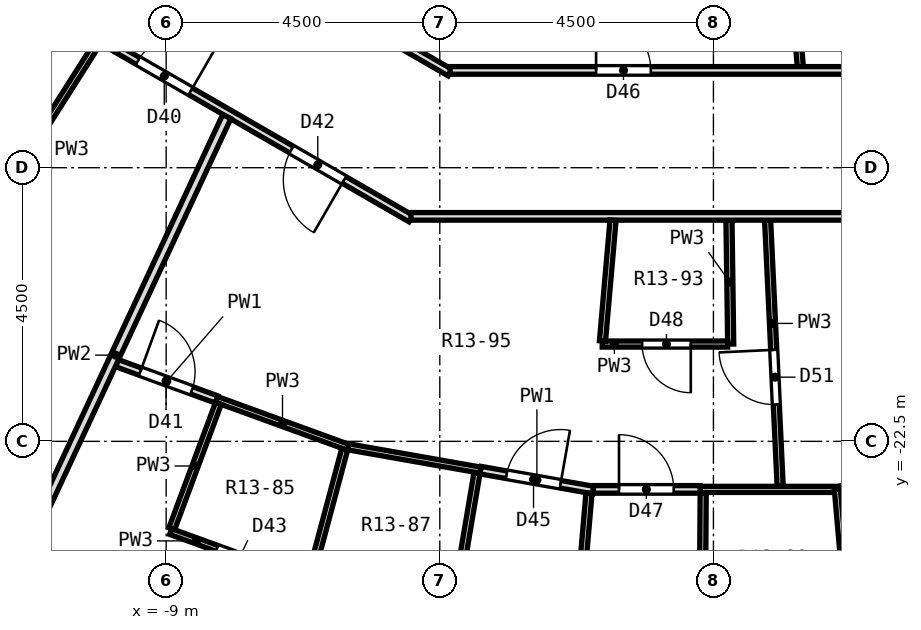
"""IFC4 building model, lengths in metres.
Left out: names, types, materials, properties, quantities, classifications, styles, units other than length and angle.
Written with IfcOpenShell. Run it as: python <this file> out.ifc"""

import sys

from ifc_helpers import new_model, si_unit, direction, frame, frame_2d, origin, place, context, subcontext, project, spatial, rectangle, extrude, element, fill, save


model = new_model("IFC4")
c1 = context("Model", 3, precision=1e-05, world=origin(), true_north=direction((0.0, 1.0)))
c2 = subcontext(c1, "Body", "Model", "MODEL_VIEW")
j1 = project(units=[si_unit("LENGTHUNIT", "METRE"), si_unit("PLANEANGLEUNIT", "RADIAN")], contexts=[c1])
p1 = place(None, origin())
s1 = spatial("IfcSite", under=j1, at=p1, CompositionType="ELEMENT")
p2 = place(p1, origin())
s2 = spatial("IfcBuilding", under=s1, at=p2, CompositionType="ELEMENT")
p3 = place(p2, frame((0.0, 0.0, 65.9)))
s3 = spatial("IfcBuildingStorey", under=s2, at=p3, CompositionType="ELEMENT", Elevation=65.9)
p4 = place(p3, frame((0.256, -18.863, 0.0), z_axis=(0.0, 0.0, 1.0), x_axis=(0.013779398664, -0.999905059579, 0.0)))
e1 = element("IfcWall", 1, at=p4, inside=s3, PredefinedType="PARTITIONING", context=c2, shape_type="SweptSolid", body=[
    extrude(rectangle(XDim=2.038, YDim=0.1, at=frame_2d((1.019, 0.0))), origin(), (0.0, 0.0, 1.0), 2.75),
])
p5 = place(p3, frame((0.891, -18.863, 0.0), z_axis=(0.0, 0.0, 1.0), x_axis=(0.047186643512, -0.998886089939, 0.0)))
e2 = element("IfcWall", 2, at=p5, inside=s3, PredefinedType="PARTITIONING", context=c2, shape_type="SweptSolid", body=[
    extrude(rectangle(XDim=4.382, YDim=0.1, at=frame_2d((2.191, 0.0))), origin(), (0.0, 0.0, 1.0), 2.75),
])
p6 = place(p5, frame((2.135, 0.0, 0.0)))
e3 = element("IfcOpeningElement", 3, at=p6, cuts=e2, PredefinedType="OPENING", context=c2, shape_type="SweptSolid", body=[
    extrude(rectangle(XDim=0.9, YDim=2.1, at=frame_2d((0.45, 1.05))), frame((0.0, 0.062, 0.0), z_axis=(0.0, -1.0, 0.0), x_axis=(1.0, 0.0, 0.0)), (0.0, 0.0, 1.0), 0.124),
])
p7 = place(p3, frame((1.102, -12.6, 0.0), z_axis=(0.0, 0.0, 1.0), x_axis=(0.087191165371, -0.996191598379, 0.0)))
e4 = element("IfcWall", 4, at=p7, inside=s3, PredefinedType="PARTITIONING", context=c2, shape_type="SweptSolid", body=[
    extrude(rectangle(XDim=3.752, YDim=0.1, at=frame_2d((1.876, 0.0))), origin(), (0.0, 0.0, 1.0), 2.75),
])
p8 = place(p3, frame((2.038, -23.29, 0.0), z_axis=(0.0, 0.0, 1.0), x_axis=(0.087200034709, -0.996190822055, 0.0)))
e5 = element("IfcWall", 5, at=p8, inside=s3, PredefinedType="PARTITIONING", context=c2, shape_type="SweptSolid", body=[
    extrude(rectangle(XDim=4.211, YDim=0.1, at=frame_2d((2.105, 0.0))), origin(), (0.0, 0.0, 1.0), 2.75),
])
p9 = place(p3, frame((-13.709, -13.794, 0.0), z_axis=(0.0, 0.0, 1.0), x_axis=(0.866059817553, -0.499940388867, 0.0)))
e6 = element("IfcWall", 6, at=p9, inside=s3, PredefinedType="PARTITIONING", context=c2, shape_type="SweptSolid", body=[
    extrude(rectangle(XDim=10.085, YDim=0.125, at=frame_2d((5.042, 0.0))), origin(), (0.0, 0.0, 1.0), 2.75),
])
p10 = place(p9, frame((1.61, 0.0, 0.0)))
e7 = element("IfcOpeningElement", 7, at=p10, cuts=e6, PredefinedType="OPENING", context=c2, shape_type="SweptSolid", body=[
    extrude(rectangle(XDim=0.9, YDim=2.1, at=frame_2d((0.45, 1.05))), frame((0.0, 0.074, 0.0), z_axis=(0.0, -1.0, 0.0), x_axis=(1.0, 0.0, 0.0)), (0.0, 0.0, 1.0), 0.149),
])
p11 = place(p9, frame((4.901, 0.0, 0.0)))
e8 = element("IfcOpeningElement", 8, at=p11, cuts=e6, PredefinedType="OPENING", context=c2, shape_type="SweptSolid", body=[
    extrude(rectangle(XDim=1.0, YDim=2.1, at=frame_2d((0.5, 1.05))), frame((0.0, 0.074, 0.0), z_axis=(0.0, -1.0, 0.0), x_axis=(1.0, 0.0, 0.0)), (0.0, 0.0, 1.0), 0.149),
])
p12 = place(p9, frame((7.816, 0.0, 0.0)))
e9 = element("IfcOpeningElement", 9, at=p12, cuts=e6, PredefinedType="OPENING", context=c2, shape_type="SweptSolid", body=[
    extrude(rectangle(XDim=1.0, YDim=2.1, at=frame_2d((0.5, 1.05))), frame((0.0, 0.074, 0.0), z_axis=(0.0, -1.0, 0.0), x_axis=(1.0, 0.0, 0.0)), (0.0, 0.0, 1.0), 0.149),
])
p13 = place(p3, frame((-12.006, -12.006, 0.0), z_axis=(0.0, 0.0, 1.0), x_axis=(0.866073188118, -0.499917225971, 0.0)))
e10 = element("IfcWall", 10, at=p13, inside=s3, PredefinedType="PARTITIONING", context=c2, shape_type="SweptSolid", body=[
    extrude(rectangle(XDim=8.861, YDim=0.125, at=frame_2d((4.431, 0.0))), origin(), (0.0, 0.0, 1.0), 2.75),
])
p14 = place(p13, frame((3.193, 0.0, 0.0)))
e11 = element("IfcOpeningElement", 11, at=p14, cuts=e10, PredefinedType="OPENING", context=c2, shape_type="SweptSolid", body=[
    extrude(rectangle(XDim=0.9, YDim=2.1, at=frame_2d((0.45, 1.05))), frame((0.0, 0.074, 0.0), z_axis=(0.0, -1.0, 0.0), x_axis=(1.0, 0.0, 0.0)), (0.0, 0.0, 1.0), 0.149),
])
p15 = place(p3, frame((-8.925, -23.983, 0.0), z_axis=(0.0, 0.0, 1.0), x_axis=(0.939643152994, -0.342156024399, 0.0)))
e12 = element("IfcWall", 12, at=p15, inside=s3, PredefinedType="PARTITIONING", context=c2, shape_type="SweptSolid", body=[
    extrude(rectangle(XDim=2.373, YDim=0.1, at=frame_2d((1.187, 0.0))), origin(), (0.0, 0.0, 1.0), 2.75),
])
p16 = place(p15, frame((0.812, 0.0, 0.0)))
e13 = element("IfcOpeningElement", 13, at=p16, cuts=e12, PredefinedType="OPENING", context=c2, shape_type="SweptSolid", body=[
    extrude(rectangle(XDim=0.8, YDim=2.1, at=frame_2d((0.4, 1.05))), frame((0.0, 0.062, 0.0), z_axis=(0.0, -1.0, 0.0), x_axis=(1.0, 0.0, 0.0)), (0.0, 0.0, 1.0), 0.124),
])
p17 = place(p3, frame((-8.17, -21.811, 0.0), z_axis=(0.0, 0.0, 1.0), x_axis=(0.939700645731, -0.341998094165, 0.0)))
e14 = element("IfcWall", 14, at=p17, inside=s3, PredefinedType="PARTITIONING", context=c2, shape_type="SweptSolid", body=[
    extrude(rectangle(XDim=2.306, YDim=0.1, at=frame_2d((1.153, 0.0))), origin(), (0.0, 0.0, 1.0), 2.75),
])
p18 = place(p3, frame((-9.809, -21.214, 0.0), z_axis=(0.0, 0.0, 1.0), x_axis=(0.939605351125, -0.342259819635, 0.0)))
e15 = element("IfcWall", 15, at=p18, inside=s3, PredefinedType="PARTITIONING", context=c2, shape_type="SweptSolid", body=[
    extrude(rectangle(XDim=1.745, YDim=0.125, at=frame_2d((0.873, 0.0))), origin(), (0.0, 0.0, 1.0), 2.75),
])
p19 = place(p18, frame((0.41, 0.0, 0.0)))
e16 = element("IfcOpeningElement", 16, at=p19, cuts=e15, PredefinedType="OPENING", context=c2, shape_type="SweptSolid", body=[
    extrude(rectangle(XDim=0.9, YDim=2.1, at=frame_2d((0.45, 1.05))), frame((0.0, 0.074, 0.0), z_axis=(0.0, -1.0, 0.0), x_axis=(1.0, 0.0, 0.0)), (0.0, 0.0, 1.0), 0.149),
])
p20 = place(p3, frame((-6.002, -22.591, 0.0), z_axis=(0.0, 0.0, 1.0), x_axis=(0.984800270927, -0.173690605338, 0.0)))
e17 = element("IfcWall", 17, at=p20, inside=s3, PredefinedType="PARTITIONING", context=c2, shape_type="SweptSolid", body=[
    extrude(rectangle(XDim=2.205, YDim=0.1, at=frame_2d((1.103, 0.0))), origin(), (0.0, 0.0, 1.0), 2.75),
])
p21 = place(p3, frame((-3.83, -22.974, 0.0), z_axis=(0.0, 0.0, 1.0), x_axis=(0.984767891191, -0.173874093757, 0.0)))
e18 = element("IfcWall", 18, at=p21, inside=s3, PredefinedType="PARTITIONING", context=c2, shape_type="SweptSolid", body=[
    extrude(rectangle(XDim=1.883, YDim=0.125, at=frame_2d((0.941, 0.0))), origin(), (0.0, 0.0, 1.0), 2.75),
])
p22 = place(p21, frame((0.435, 0.0, 0.0)))
e19 = element("IfcOpeningElement", 19, at=p22, cuts=e18, PredefinedType="OPENING", context=c2, shape_type="SweptSolid", body=[
    extrude(rectangle(XDim=0.9, YDim=2.1, at=frame_2d((0.45, 1.05))), frame((0.0, 0.074, 0.0), z_axis=(0.0, -1.0, 0.0), x_axis=(1.0, 0.0, 0.0)), (0.0, 0.0, 1.0), 0.149),
])
p23 = place(p3, frame((-0.218, -23.29, 0.0), z_axis=(0.0, 0.0, 1.0), x_axis=(1.0, 0.0, 0.0)))
e20 = element("IfcWall", 20, at=p23, inside=s3, PredefinedType="PARTITIONING", context=c2, shape_type="SweptSolid", body=[
    extrude(rectangle(XDim=2.206, YDim=0.1, at=frame_2d((1.103, 0.0))), origin(), (0.0, 0.0, 1.0), 2.75),
])
p24 = place(p3, frame((-1.976, -23.29, 0.0), z_axis=(0.0, 0.0, 1.0), x_axis=(1.0, 0.0, 0.0)))
e21 = element("IfcWall", 21, at=p24, inside=s3, PredefinedType="PARTITIONING", context=c2, shape_type="SweptSolid", body=[
    extrude(rectangle(XDim=1.758, YDim=0.125, at=frame_2d((0.879, 0.0))), origin(), (0.0, 0.0, 1.0), 2.75),
])
p25 = place(p24, frame((0.423, 0.0, 0.0)))
e22 = element("IfcOpeningElement", 22, at=p25, cuts=e21, PredefinedType="OPENING", context=c2, shape_type="SweptSolid", body=[
    extrude(rectangle(XDim=0.9, YDim=2.1, at=frame_2d((0.45, 1.05))), frame((0.0, 0.074, 0.0), z_axis=(0.0, -1.0, 0.0), x_axis=(1.0, 0.0, 0.0)), (0.0, 0.0, 1.0), 0.149),
])
p26 = place(p3, frame((-1.829, -20.9, 0.0), z_axis=(0.0, 0.0, 1.0), x_axis=(1.0, 0.0, 0.0)))
e23 = element("IfcWall", 23, at=p26, inside=s3, PredefinedType="PARTITIONING", context=c2, shape_type="SweptSolid", body=[
    extrude(rectangle(XDim=2.063, YDim=0.1, at=frame_2d((1.031, 0.0))), origin(), (0.0, 0.0, 1.0), 2.75),
])
p27 = place(p26, frame((0.656, 0.0, 0.0)))
e24 = element("IfcOpeningElement", 24, at=p27, cuts=e23, PredefinedType="OPENING", context=c2, shape_type="SweptSolid", body=[
    extrude(rectangle(XDim=0.8, YDim=2.1, at=frame_2d((0.4, 1.05))), frame((0.0, 0.062, 0.0), z_axis=(0.0, -1.0, 0.0), x_axis=(1.0, 0.0, 0.0)), (0.0, 0.0, 1.0), 0.124),
])
p28 = place(p3, frame((-4.975, -18.8, 0.0), z_axis=(0.0, 0.0, 1.0), x_axis=(1.0, 0.0, 0.0)))
e25 = element("IfcWall", 25, at=p28, inside=s3, PredefinedType="PARTITIONING", context=c2, shape_type="SweptSolid", body=[
    extrude(rectangle(XDim=9.937, YDim=0.125, at=frame_2d((4.968, 0.0))), origin(), (0.0, 0.0, 1.0), 2.75),
])
p29 = place(p3, frame((-4.332, -16.4, 0.0), z_axis=(0.0, 0.0, 1.0), x_axis=(1.0, 0.0, 0.0)))
e26 = element("IfcWall", 26, at=p29, inside=s3, PredefinedType="PARTITIONING", context=c2, shape_type="SweptSolid", body=[
    extrude(rectangle(XDim=8.798, YDim=0.125, at=frame_2d((4.399, 0.0))), origin(), (0.0, 0.0, 1.0), 2.75),
])
p30 = place(p29, frame((2.402, 0.0, 0.0)))
e27 = element("IfcOpeningElement", 27, at=p30, cuts=e26, PredefinedType="OPENING", context=c2, shape_type="SweptSolid", body=[
    extrude(rectangle(XDim=0.9, YDim=2.1, at=frame_2d((0.45, 1.05))), frame((0.0, 0.074, 0.0), z_axis=(0.0, -1.0, 0.0), x_axis=(1.0, 0.0, 0.0)), (0.0, 0.0, 1.0), 0.149),
])
p31 = place(p3, frame((2.087, -23.281, 0.0), z_axis=(0.0, 0.0, 1.0), x_axis=(0.984804573467, 0.173666208797, 0.0)))
e28 = element("IfcWall", 28, at=p31, inside=s3, PredefinedType="PARTITIONING", context=c2, shape_type="SweptSolid", body=[
    extrude(rectangle(XDim=2.104, YDim=0.1, at=frame_2d((1.052, 0.0))), origin(), (0.0, 0.0, 1.0), 2.75),
])
p32 = place(p3, frame((-12.361, -19.467, 0.0), z_axis=(0.0, 0.0, 1.0), x_axis=(0.535975761714, 0.844233369901, 0.0)))
e29 = element("IfcWall", 29, at=p32, inside=s3, PredefinedType="PARTITIONING", context=c2, shape_type="SweptSolid", body=[
    extrude(rectangle(XDim=4.18, YDim=0.1, at=frame_2d((2.09, 0.0))), origin(), (0.0, 0.0, 1.0), 2.75),
])
p33 = place(p3, frame((-11.659, -25.006, 0.0), z_axis=(0.0, 0.0, 1.0), x_axis=(0.422344925588, 0.906435195604, 0.0)))
e30 = element("IfcWall", 30, at=p33, inside=s3, PredefinedType="PARTITIONING", context=c2, shape_type="SweptSolid", body=[
    extrude(rectangle(XDim=8.655, YDim=0.15, at=frame_2d((4.328, 0.0))), origin(), (0.0, 0.0, 1.0), 2.75),
])
p34 = place(p3, frame((-8.907, -23.936, 0.0), z_axis=(0.0, 0.0, 1.0), x_axis=(0.348774527409, 0.937206662925, 0.0)))
e31 = element("IfcWall", 31, at=p34, inside=s3, PredefinedType="PARTITIONING", context=c2, shape_type="SweptSolid", body=[
    extrude(rectangle(XDim=2.199, YDim=0.1, at=frame_2d((1.1, 0.0))), origin(), (0.0, 0.0, 1.0), 2.75),
])
p35 = place(p3, frame((-7.14, -26.65, 0.0), z_axis=(0.0, 0.0, 1.0), x_axis=(0.258611937806, 0.965981296726, 0.0)))
e32 = element("IfcWall", 32, at=p35, inside=s3, PredefinedType="PARTITIONING", context=c2, shape_type="SweptSolid", body=[
    extrude(rectangle(XDim=4.161, YDim=0.1, at=frame_2d((2.081, 0.0))), origin(), (0.0, 0.0, 1.0), 2.75),
])
p36 = place(p3, frame((-4.254, -25.184, 0.0), z_axis=(0.0, 0.0, 1.0), x_axis=(0.166534432253, 0.986035639759, 0.0)))
e33 = element("IfcWall", 33, at=p36, inside=s3, PredefinedType="PARTITIONING", context=c2, shape_type="SweptSolid", body=[
    extrude(rectangle(XDim=2.187, YDim=0.1, at=frame_2d((1.094, 0.0))), origin(), (0.0, 0.0, 1.0), 2.75),
])
p37 = place(p3, frame((-2.405, -27.485, 0.0), z_axis=(0.0, 0.0, 1.0), x_axis=(0.086512794622, 0.996250739707, 0.0)))
e34 = element("IfcWall", 34, at=p37, inside=s3, PredefinedType="PARTITIONING", context=c2, shape_type="SweptSolid", body=[
    extrude(rectangle(XDim=4.148, YDim=0.1, at=frame_2d((2.074, 0.0))), origin(), (0.0, 0.0, 1.0), 2.75),
])
p38 = place(p3, frame((-1.825, -20.85, 0.0), z_axis=(0.0, 0.0, 1.0), x_axis=(0.087115345234, 0.996198231591, 0.0)))
e35 = element("IfcWall", 35, at=p38, inside=s3, PredefinedType="PARTITIONING", context=c2, shape_type="SweptSolid", body=[
    extrude(rectangle(XDim=1.995, YDim=0.1, at=frame_2d((0.998, 0.0))), origin(), (0.0, 0.0, 1.0), 2.75),
])
p39 = place(p3, frame((-0.184, -25.54, 0.0), z_axis=(0.0, 0.0, 1.0), x_axis=(0.006919477202, 0.999976060131, 0.0)))
e36 = element("IfcWall", 36, at=p39, inside=s3, PredefinedType="PARTITIONING", context=c2, shape_type="SweptSolid", body=[
    extrude(rectangle(XDim=2.188, YDim=0.1, at=frame_2d((1.094, 0.0))), origin(), (0.0, 0.0, 1.0), 2.75),
])
p40 = place(p11, origin())
e37 = element("IfcDoor", 37, at=p40, inside=s3, OperationType="SINGLE_SWING_RIGHT", PredefinedType="DOOR", context=c2, shape_type="SweptSolid", body=[
    extrude(rectangle(XDim=1.0, YDim=2.1, at=frame_2d((0.5, 1.05))), frame((0.0, 0.025, 0.0), z_axis=(0.0, -1.0, 0.0), x_axis=(1.0, 0.0, 0.0)), (0.0, 0.0, 1.0), 0.05),
])
fill(e8, e37)
p41 = place(p19, origin())
e38 = element("IfcDoor", 38, at=p41, inside=s3, OperationType="SINGLE_SWING_LEFT", PredefinedType="DOOR", context=c2, shape_type="SweptSolid", body=[
    extrude(rectangle(XDim=0.9, YDim=2.1, at=frame_2d((0.45, 1.05))), frame((0.0, 0.025, 0.0), z_axis=(0.0, -1.0, 0.0), x_axis=(1.0, 0.0, 0.0)), (0.0, 0.0, 1.0), 0.05),
])
fill(e16, e38)
p42 = place(p12, frame((1.0, 0.0, 0.0), z_axis=(0.0, 0.0, 1.0), x_axis=(-1.0, 0.0, 0.0)))
e39 = element("IfcDoor", 39, at=p42, inside=s3, OperationType="SINGLE_SWING_LEFT", PredefinedType="DOOR", context=c2, shape_type="SweptSolid", body=[
    extrude(rectangle(XDim=1.0, YDim=2.1, at=frame_2d((0.5, 1.05))), frame((0.0, 0.025, 0.0), z_axis=(0.0, -1.0, 0.0), x_axis=(1.0, 0.0, 0.0)), (0.0, 0.0, 1.0), 0.05),
])
fill(e9, e39)
p43 = place(p16, frame((0.8, 0.0, 0.0), z_axis=(0.0, 0.0, 1.0), x_axis=(-1.0, 0.0, 0.0)))
e40 = element("IfcDoor", 40, at=p43, inside=s3, OperationType="SINGLE_SWING_LEFT", PredefinedType="DOOR", context=c2, shape_type="SweptSolid", body=[
    extrude(rectangle(XDim=0.8, YDim=2.1, at=frame_2d((0.4, 1.05))), frame((0.0, 0.025, 0.0), z_axis=(0.0, -1.0, 0.0), x_axis=(1.0, 0.0, 0.0)), (0.0, 0.0, 1.0), 0.05),
])
fill(e13, e40)
p44 = place(p22, origin())
e41 = element("IfcDoor", 41, at=p44, inside=s3, OperationType="SINGLE_SWING_RIGHT", PredefinedType="DOOR", context=c2, shape_type="SweptSolid", body=[
    extrude(rectangle(XDim=0.9, YDim=2.1, at=frame_2d((0.45, 1.05))), frame((0.0, 0.025, 0.0), z_axis=(0.0, -1.0, 0.0), x_axis=(1.0, 0.0, 0.0)), (0.0, 0.0, 1.0), 0.05),
])
fill(e19, e41)
p45 = place(p30, origin())
e42 = element("IfcDoor", 42, at=p45, inside=s3, OperationType="SINGLE_SWING_LEFT", PredefinedType="DOOR", context=c2, shape_type="SweptSolid", body=[
    extrude(rectangle(XDim=0.9, YDim=2.1, at=frame_2d((0.45, 1.05))), frame((0.0, 0.025, 0.0), z_axis=(0.0, -1.0, 0.0), x_axis=(1.0, 0.0, 0.0)), (0.0, 0.0, 1.0), 0.05),
])
fill(e27, e42)
p46 = place(p25, origin())
e43 = element("IfcDoor", 43, at=p46, inside=s3, OperationType="SINGLE_SWING_LEFT", PredefinedType="DOOR", context=c2, shape_type="SweptSolid", body=[
    extrude(rectangle(XDim=0.9, YDim=2.1, at=frame_2d((0.45, 1.05))), frame((0.0, 0.025, 0.0), z_axis=(0.0, -1.0, 0.0), x_axis=(1.0, 0.0, 0.0)), (0.0, 0.0, 1.0), 0.05),
])
fill(e22, e43)
p47 = place(p27, frame((0.8, 0.0, 0.0), z_axis=(0.0, 0.0, 1.0), x_axis=(-1.0, 0.0, 0.0)))
e44 = element("IfcDoor", 44, at=p47, inside=s3, OperationType="SINGLE_SWING_LEFT", PredefinedType="DOOR", context=c2, shape_type="SweptSolid", body=[
    extrude(rectangle(XDim=0.8, YDim=2.1, at=frame_2d((0.4, 1.05))), frame((0.0, 0.025, 0.0), z_axis=(0.0, -1.0, 0.0), x_axis=(1.0, 0.0, 0.0)), (0.0, 0.0, 1.0), 0.05),
])
fill(e24, e44)
p48 = place(p6, frame((0.9, 0.0, 0.0), z_axis=(0.0, 0.0, 1.0), x_axis=(-1.0, 0.0, 0.0)))
e45 = element("IfcDoor", 45, at=p48, inside=s3, OperationType="SINGLE_SWING_RIGHT", PredefinedType="DOOR", context=c2, shape_type="SweptSolid", body=[
    extrude(rectangle(XDim=0.9, YDim=2.1, at=frame_2d((0.45, 1.05))), frame((0.0, 0.025, 0.0), z_axis=(0.0, -1.0, 0.0), x_axis=(1.0, 0.0, 0.0)), (0.0, 0.0, 1.0), 0.05),
])
fill(e3, e45)
save(model, sys.argv[1])
